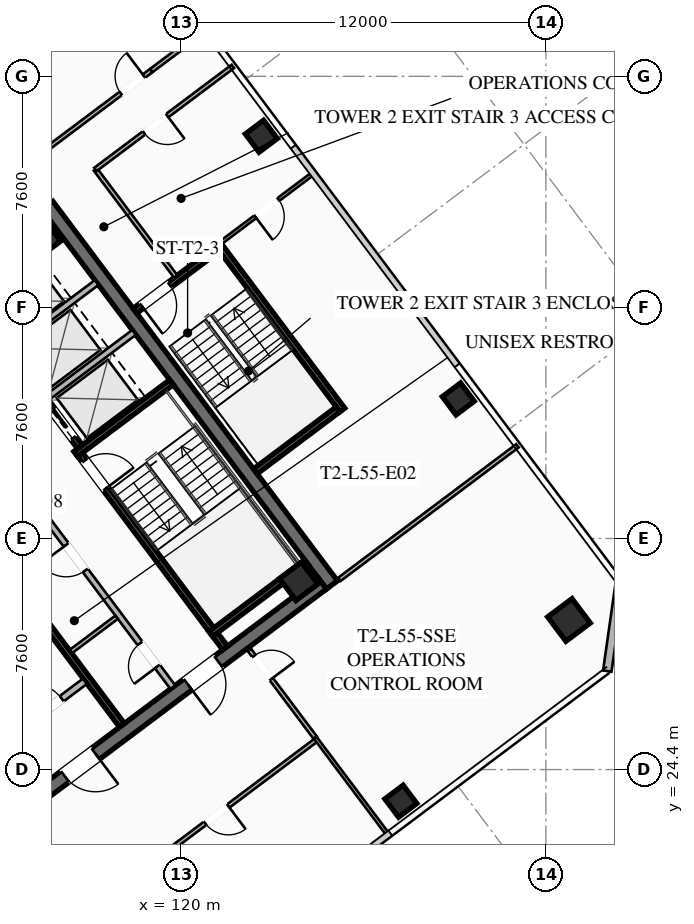
"""IFC4 building model, lengths in metres.
Left out: names, types, materials, properties, quantities, classifications, styles, units other than length and angle.
Written with IfcOpenShell. Run it as: python <this file> out.ifc"""

import sys

from ifc_helpers import new_model, si_unit, direction, frame, frame_2d, origin, origin_2d, place, context, subcontext, project, spatial, rectangle, hollow_rectangle, extrude, element, fill, save


model = new_model("IFC4")
c1 = context("Model", 3, precision=1e-05, world=origin(), true_north=direction((0.0, 1.0)))
c2 = subcontext(c1, "Body", "Model", "MODEL_VIEW")
j1 = project(units=[si_unit("LENGTHUNIT", "METRE"), si_unit("PLANEANGLEUNIT", "RADIAN")], contexts=[c1])
p1 = place(None, origin())
s1 = spatial("IfcSite", under=j1, at=p1, CompositionType="ELEMENT")
p2 = place(p1, origin())
s2 = spatial("IfcBuilding", under=s1, at=p2, CompositionType="ELEMENT")
p3 = place(p2, frame((0.0, 0.0, 204.2)))
s3 = spatial("IfcBuildingStorey", under=s2, at=p3, CompositionType="ELEMENT", Elevation=204.2)
p4 = place(p3, frame((115.604, 42.953, 0.0), z_axis=(0.0, 0.0, 1.0), x_axis=(0.600005007985, -0.799996243986, 0.0)))
e1 = element("IfcWall", 1, at=p4, inside=s3, PredefinedType="SHEAR", context=c2, shape_type="SweptSolid", body=[
    extrude(rectangle(XDim=15.6, YDim=0.45, at=frame_2d((7.8, 0.0))), origin(), (0.0, 0.0, 1.0), 3.55),
])
p5 = place(p3, frame((124.649, 30.518, 0.0), z_axis=(0.0, 0.0, 1.0), x_axis=(-0.8, -0.6, 0.0)))
e2 = element("IfcWall", 2, at=p5, inside=s3, PredefinedType="SHEAR", context=c2, shape_type="SweptSolid", body=[
    extrude(rectangle(XDim=15.26, YDim=0.45, at=frame_2d((7.63, 0.0))), origin(), (0.0, 0.0, 1.0), 3.55),
])
p6 = place(p5, frame((9.33, 0.0, 0.0)))
e3 = element("IfcOpeningElement", 3, at=p6, cuts=e2, PredefinedType="OPENING", context=c2, shape_type="SweptSolid", body=[
    extrude(rectangle(XDim=1.25, YDim=2.25, at=frame_2d((0.625, 1.125))), frame((0.0, 0.235, 0.0), z_axis=(0.0, -1.0, 0.0), x_axis=(1.0, 0.0, 0.0)), (0.0, 0.0, 1.0), 0.47),
])
p7 = place(p5, frame((4.28, 0.0, 0.0)))
e4 = element("IfcOpeningElement", 4, at=p7, cuts=e2, PredefinedType="OPENING", context=c2, shape_type="SweptSolid", body=[
    extrude(rectangle(XDim=1.25, YDim=2.25, at=frame_2d((0.625, 1.125))), frame((0.0, 0.235, 0.0), z_axis=(0.0, -1.0, 0.0), x_axis=(1.0, 0.0, 0.0)), (0.0, 0.0, 1.0), 0.47),
])
for number, where, z_axis, x_axis in (
    (5, (123.87, 30.59, 0.0), (0.0, 0.0, 1.0), (0.8, 0.6, 0.0)),
    (6, (115.41, 41.87, 0.0), (0.0, 0.0, 1.0), (0.8, 0.6, 0.0)),
):
    element("IfcColumn", number, at=place(p3, frame(where, z_axis=z_axis, x_axis=x_axis)), inside=s3, PredefinedType="COLUMN", context=c2, shape_type="SweptSolid", body=[
        extrude(hollow_rectangle(XDim=0.9, YDim=0.9, WallThickness=0.04, at=origin_2d()), origin(), (0.0, 0.0, 1.0), 3.37),
    ])
p8 = place(p3, frame((132.76, 29.32, 0.0), z_axis=(0.0, 0.0, 1.0), x_axis=(0.799999996291, 0.600000004945, 0.0)))
e7 = element("IfcColumn", 7, at=p8, inside=s3, PredefinedType="COLUMN", context=c2, shape_type="SweptSolid", body=[
    extrude(hollow_rectangle(XDim=1.0, YDim=1.0, WallThickness=0.04, at=origin_2d()), origin(), (0.0, 0.0, 1.0), 3.37),
])
for number, where, z_axis, x_axis in (
    (8, (127.23, 23.36, 0.0), (0.0, 0.0, 1.0), (0.8, 0.6, 0.0)),
    (9, (129.12, 36.59, 0.0), (0.0, 0.0, 1.0), (0.8, 0.6, 0.0)),
    (10, (122.64, 45.23, 0.0), (0.0, 0.0, 1.0), (0.8, 0.6, 0.0)),
):
    element("IfcColumn", number, at=place(p3, frame(where, z_axis=z_axis, x_axis=x_axis)), inside=s3, PredefinedType="COLUMN", context=c2, shape_type="SweptSolid", body=[
        extrude(hollow_rectangle(XDim=0.75, YDim=0.75, WallThickness=0.032, at=origin_2d()), origin(), (0.0, 0.0, 1.0), 3.37),
    ])
p9 = place(p3, frame((134.44, 30.58, 0.0), z_axis=(0.0, 0.0, 1.0), x_axis=(-0.14138683146, -0.989954425158, 0.0)))
e11 = element("IfcWall", 11, at=p9, inside=s3, PredefinedType="SOLIDWALL", context=c2, shape_type="SweptSolid", body=[
    extrude(rectangle(XDim=2.97, YDim=0.28, at=frame_2d((1.485, 0.0))), origin(), (0.0, 0.0, 1.0), 3.37),
])
p10 = place(p3, frame((116.56, 34.92, 0.0), z_axis=(0.0, 0.0, 1.0), x_axis=(0.59999041401, -0.800007189403, 0.0)))
e12 = element("IfcWall", 12, at=p10, inside=s3, PredefinedType="SHEAR", context=c2, shape_type="SweptSolid", body=[
    extrude(rectangle(XDim=8.15, YDim=0.2, at=frame_2d((4.075, 0.0))), origin(), (0.0, 0.0, 1.0), 3.37),
])
p11 = place(p10, frame((0.45, 0.0, 0.0)))
e13 = element("IfcOpeningElement", 13, at=p11, cuts=e12, PredefinedType="OPENING", context=c2, shape_type="SweptSolid", body=[
    extrude(rectangle(XDim=1.15, YDim=2.2, at=frame_2d((0.575, 1.1))), frame((0.0, 0.11, 0.0), z_axis=(0.0, -1.0, 0.0), x_axis=(1.0, 0.0, 0.0)), (0.0, 0.0, 1.0), 0.22),
])
for number, where, z_axis, x_axis in (
    (14, (116.54, 34.78, 0.0), (0.0, 0.0, 1.0), (0.8, 0.6, 0.0)),
    (15, (120.98, 28.86, 0.0), (0.0, 0.0, 1.0), (0.8, 0.6, 0.0)),
):
    element("IfcWall", number, at=place(p3, frame(where, z_axis=z_axis, x_axis=x_axis)), inside=s3, PredefinedType="SHEAR", context=c2, shape_type="SweptSolid", body=[
        extrude(rectangle(XDim=3.93, YDim=0.2, at=frame_2d((1.965, 0.0))), origin(), (0.0, 0.0, 1.0), 3.37),
    ])
p12 = place(p3, frame((118.058, 25.856, 0.0), z_axis=(0.0, 0.0, 1.0), x_axis=(-0.600002657301, 0.799998007018, 0.0)))
e16 = element("IfcWall", 16, at=p12, inside=s3, PredefinedType="SHEAR", context=c2, shape_type="SweptSolid", body=[
    extrude(rectangle(XDim=14.7, YDim=0.2, at=frame_2d((7.35, 0.0))), origin(), (0.0, 0.0, 1.0), 3.37),
])
p13 = place(p3, frame((114.316, 25.412, 0.0), z_axis=(0.0, 0.0, 1.0), x_axis=(0.800018601094, 0.59997519774, 0.0)))
e17 = element("IfcWall", 17, at=p13, inside=s3, PredefinedType="SOLIDWALL", context=c2, shape_type="SweptSolid", body=[
    extrude(rectangle(XDim=3.15, YDim=0.22, at=frame_2d((1.575, 0.0))), origin(), (0.0, 0.0, 1.0), 2.723),
])
p14 = place(p13, frame((0.95, 0.0, 0.0)))
e18 = element("IfcOpeningElement", 18, at=p14, cuts=e17, PredefinedType="OPENING", context=c2, shape_type="SweptSolid", body=[
    extrude(rectangle(XDim=1.25, YDim=2.25, at=frame_2d((0.625, 1.125))), frame((0.0, 0.12, 0.0), z_axis=(0.0, -1.0, 0.0), x_axis=(1.0, 0.0, 0.0)), (0.0, 0.0, 1.0), 0.24),
])
p15 = place(p3, frame((112.75, 40.25, 0.0), z_axis=(0.0, 0.0, 1.0), x_axis=(0.599994036198, -0.800004472816, 0.0)))
e19 = element("IfcWall", 19, at=p15, inside=s3, PredefinedType="SHEAR", context=c2, shape_type="SweptSolid", body=[
    extrude(rectangle(XDim=6.55, YDim=0.2, at=frame_2d((3.275, 0.0))), origin(), (0.0, 0.0, 1.0), 3.37),
])
p16 = place(p15, frame((5.075, 0.0, 0.0)))
e20 = element("IfcOpeningElement", 20, at=p16, cuts=e19, PredefinedType="OPENING", context=c2, shape_type="SweptSolid", body=[
    extrude(rectangle(XDim=1.1, YDim=2.2, at=frame_2d((0.55, 1.1))), frame((0.0, 0.11, 0.0), z_axis=(0.0, -1.0, 0.0), x_axis=(1.0, 0.0, 0.0)), (0.0, 0.0, 1.0), 0.22),
])
p17 = place(p15, frame((3.025, 0.0, 0.0)))
e21 = element("IfcOpeningElement", 21, at=p17, cuts=e19, PredefinedType="OPENING", context=c2, shape_type="SweptSolid", body=[
    extrude(rectangle(XDim=1.1, YDim=2.2, at=frame_2d((0.55, 1.1))), frame((0.0, 0.11, 0.0), z_axis=(0.0, -1.0, 0.0), x_axis=(1.0, 0.0, 0.0)), (0.0, 0.0, 1.0), 0.22),
])
p18 = place(p15, frame((1.025, 0.0, 0.0)))
e22 = element("IfcOpeningElement", 22, at=p18, cuts=e19, PredefinedType="OPENING", context=c2, shape_type="SweptSolid", body=[
    extrude(rectangle(XDim=1.1, YDim=2.2, at=frame_2d((0.55, 1.1))), frame((0.0, 0.11, 0.0), z_axis=(0.0, -1.0, 0.0), x_axis=(1.0, 0.0, 0.0)), (0.0, 0.0, 1.0), 0.22),
])
for number, where, z_axis, x_axis in (
    (23, (115.59, 36.63, 0.0), (0.0, 0.0, 1.0), (0.8, 0.6, 0.0)),
    (24, (114.36, 38.27, 0.0), (0.0, 0.0, 1.0), (0.8, 0.6, 0.0)),
):
    element("IfcWall", number, at=place(p3, frame(where, z_axis=z_axis, x_axis=x_axis)), inside=s3, PredefinedType="SOLIDWALL", context=c2, shape_type="SweptSolid", body=[
        extrude(rectangle(XDim=3.58, YDim=0.2, at=frame_2d((1.79, 0.0))), origin(), (0.0, 0.0, 1.0), 3.37),
    ])
p19 = place(p3, frame((119.73, 27.11, 0.0), z_axis=(0.0, 0.0, 1.0), x_axis=(-0.600005580459, 0.799995814625, 0.0)))
e25 = element("IfcWall", 25, at=p19, inside=s3, PredefinedType="SOLIDWALL", context=c2, shape_type="SweptSolid", body=[
    extrude(rectangle(XDim=7.0, YDim=0.2, at=frame_2d((3.5, 0.0))), origin(), (0.0, 0.0, 1.0), 2.723),
])
p20 = place(p19, frame((0.85, 0.0, 0.0)))
e26 = element("IfcOpeningElement", 26, at=p20, cuts=e25, PredefinedType="OPENING", context=c2, shape_type="SweptSolid", body=[
    extrude(rectangle(XDim=0.95, YDim=2.05, at=frame_2d((0.475, 1.025))), frame((0.0, 0.11, 0.0), z_axis=(0.0, -1.0, 0.0), x_axis=(1.0, 0.0, 0.0)), (0.0, 0.0, 1.0), 0.22),
])
p21 = place(p19, frame((4.8, 0.0, 0.0)))
e27 = element("IfcOpeningElement", 27, at=p21, cuts=e25, PredefinedType="OPENING", context=c2, shape_type="SweptSolid", body=[
    extrude(rectangle(XDim=1.05, YDim=2.2, at=frame_2d((0.525, 1.1))), frame((0.0, 0.11, 0.0), z_axis=(0.0, -1.0, 0.0), x_axis=(1.0, 0.0, 0.0)), (0.0, 0.0, 1.0), 0.22),
])
p22 = place(p3, frame((116.376, 28.282, 0.0), z_axis=(0.0, 0.0, 1.0), x_axis=(0.8, 0.6, 0.0)))
e28 = element("IfcWall", 28, at=p22, inside=s3, PredefinedType="PARTITIONING", context=c2, shape_type="SweptSolid", body=[
    extrude(rectangle(XDim=1.88, YDim=0.135, at=frame_2d((0.94, 0.0))), origin(), (0.0, 0.0, 1.0), 2.723),
])
p23 = place(p3, frame((125.304, 36.228, 0.0), z_axis=(0.0, 0.0, 1.0), x_axis=(-0.59998851072, 0.800008616831, 0.0)))
e29 = element("IfcWall", 29, at=p23, inside=s3, PredefinedType="SHEAR", context=c2, shape_type="SweptSolid", body=[
    extrude(rectangle(XDim=6.8, YDim=0.2, at=frame_2d((3.4, 0.0))), origin(), (0.0, 0.0, 1.0), 3.37),
])
p24 = place(p3, frame((121.204, 41.528, 0.0), z_axis=(0.0, 0.0, 1.0), x_axis=(-0.800017232136, -0.599977023131, 0.0)))
e30 = element("IfcWall", 30, at=p24, inside=s3, PredefinedType="SHEAR", context=c2, shape_type="SweptSolid", body=[
    extrude(rectangle(XDim=3.4, YDim=0.2, at=frame_2d((1.7, 0.0))), origin(), (0.0, 0.0, 1.0), 3.37),
])
p25 = place(p24, frame((1.975, 0.0, 0.0)))
e31 = element("IfcOpeningElement", 31, at=p25, cuts=e30, PredefinedType="OPENING", context=c2, shape_type="SweptSolid", body=[
    extrude(rectangle(XDim=1.15, YDim=2.2, at=frame_2d((0.575, 1.1))), frame((0.0, 0.11, 0.0), z_axis=(0.0, -1.0, 0.0), x_axis=(1.0, 0.0, 0.0)), (0.0, 0.0, 1.0), 0.22),
])
p26 = place(p3, frame((122.444, 34.208, 0.0), z_axis=(0.0, 0.0, 1.0), x_axis=(0.79999138319, 0.600011488909, 0.0)))
e32 = element("IfcWall", 32, at=p26, inside=s3, PredefinedType="SHEAR", context=c2, shape_type="SweptSolid", body=[
    extrude(rectangle(XDim=3.4, YDim=0.2, at=frame_2d((1.7, 0.0))), origin(), (0.0, 0.0, 1.0), 3.37),
])
p27 = place(p3, frame((119.824, 40.618, 0.0), z_axis=(0.0, 0.0, 1.0), x_axis=(-0.599982243973, 0.800013316712, 0.0)))
e33 = element("IfcWall", 33, at=p27, inside=s3, PredefinedType="PARTITIONING", context=c2, shape_type="SweptSolid", body=[
    extrude(rectangle(XDim=4.4, YDim=0.135, at=frame_2d((2.2, 0.0))), origin(), (0.0, 0.0, 1.0), 2.723),
])
p28 = place(p3, frame((100.756, 33.692, 0.0), z_axis=(0.0, 0.0, 1.0), x_axis=(0.799998716732, 0.60000171102, 0.0)))
e34 = element("IfcWall", 34, at=p28, inside=s3, PredefinedType="PARTITIONING", context=c2, shape_type="SweptSolid", body=[
    extrude(rectangle(XDim=22.83, YDim=0.135, at=frame_2d((11.415, 0.0))), origin(), (0.0, 0.0, 1.0), 2.723),
])
p29 = place(p28, frame((9.38, 0.0, 0.0)))
e35 = element("IfcOpeningElement", 35, at=p29, cuts=e34, PredefinedType="OPENING", context=c2, shape_type="SweptSolid", body=[
    extrude(rectangle(XDim=0.95, YDim=2.05, at=frame_2d((0.475, 1.025))), frame((0.0, 0.077, 0.0), z_axis=(0.0, -1.0, 0.0), x_axis=(1.0, 0.0, 0.0)), (0.0, 0.0, 1.0), 0.155),
])
p30 = place(p28, frame((21.58, 0.0, 0.0)))
e36 = element("IfcOpeningElement", 36, at=p30, cuts=e34, PredefinedType="OPENING", context=c2, shape_type="SweptSolid", body=[
    extrude(rectangle(XDim=0.95, YDim=2.05, at=frame_2d((0.475, 1.025))), frame((0.0, 0.077, 0.0), z_axis=(0.0, -1.0, 0.0), x_axis=(1.0, 0.0, 0.0)), (0.0, 0.0, 1.0), 0.155),
])
p31 = place(p3, frame((119.02, 47.39, 0.0), z_axis=(0.0, 0.0, 1.0), x_axis=(0.799960585956, 0.600052548463, 0.0)))
e37 = element("IfcWall", 37, at=p31, inside=s3, PredefinedType="PARTITIONING", context=c2, shape_type="SweptSolid", body=[
    extrude(rectangle(XDim=2.23, YDim=0.135, at=frame_2d((1.115, 0.0))), origin(), (0.0, 0.0, 1.0), 2.723),
])
p32 = place(p3, frame((124.462, 25.384, 0.0), z_axis=(0.0, 0.0, 1.0), x_axis=(-0.799997904343, -0.6000027942, 0.0)))
e38 = element("IfcWall", 38, at=p32, inside=s3, PredefinedType="PARTITIONING", context=c2, shape_type="SweptSolid", body=[
    extrude(rectangle(XDim=13.98, YDim=0.135, at=frame_2d((6.99, 0.0))), origin(), (0.0, 0.0, 1.0), 2.723),
])
p33 = place(p32, frame((3.635, 0.0, 0.0)))
e39 = element("IfcOpeningElement", 39, at=p33, cuts=e38, PredefinedType="OPENING", context=c2, shape_type="SweptSolid", body=[
    extrude(rectangle(XDim=0.95, YDim=2.05, at=frame_2d((0.475, 1.025))), frame((0.0, 0.077, 0.0), z_axis=(0.0, -1.0, 0.0), x_axis=(1.0, 0.0, 0.0)), (0.0, 0.0, 1.0), 0.155),
])
p34 = place(p3, frame((122.248, 28.336, 0.0), z_axis=(0.0, 0.0, 1.0), x_axis=(0.600010820699, -0.799991884361, 0.0)))
e40 = element("IfcWall", 40, at=p34, inside=s3, PredefinedType="PARTITIONING", context=c2, shape_type="SweptSolid", body=[
    extrude(rectangle(XDim=3.61, YDim=0.135, at=frame_2d((1.805, 0.0))), origin(), (0.0, 0.0, 1.0), 2.723),
])
p35 = place(p34, frame((0.25, 0.0, 0.0)))
e41 = element("IfcOpeningElement", 41, at=p35, cuts=e40, PredefinedType="OPENING", context=c2, shape_type="SweptSolid", body=[
    extrude(rectangle(XDim=0.95, YDim=2.05, at=frame_2d((0.475, 1.025))), frame((0.0, 0.077, 0.0), z_axis=(0.0, -1.0, 0.0), x_axis=(1.0, 0.0, 0.0)), (0.0, 0.0, 1.0), 0.155),
])
p36 = place(p3, frame((126.808, 22.256, 0.0), z_axis=(0.0, 0.0, 1.0), x_axis=(-0.600019580308, 0.799985314394, 0.0)))
e42 = element("IfcWall", 42, at=p36, inside=s3, PredefinedType="PARTITIONING", context=c2, shape_type="SweptSolid", body=[
    extrude(rectangle(XDim=3.99, YDim=0.11, at=frame_2d((1.995, 0.0))), origin(), (0.0, 0.0, 1.0), 2.723),
])
p37 = place(p3, frame((121.704, 47.528, 0.0), z_axis=(0.0, 0.0, 1.0), x_axis=(-0.799989629485, -0.600013827105, 0.0)))
e43 = element("IfcWall", 43, at=p37, inside=s3, PredefinedType="PARTITIONING", context=c2, shape_type="SweptSolid", body=[
    extrude(rectangle(XDim=5.65, YDim=0.135, at=frame_2d((2.825, 0.0))), origin(), (0.0, 0.0, 1.0), 2.723),
])
p38 = place(p37, frame((2.7, 0.0, 0.0)))
e44 = element("IfcOpeningElement", 44, at=p38, cuts=e43, PredefinedType="OPENING", context=c2, shape_type="SweptSolid", body=[
    extrude(rectangle(XDim=0.95, YDim=2.05, at=frame_2d((0.475, 1.025))), frame((0.0, 0.077, 0.0), z_axis=(0.0, -1.0, 0.0), x_axis=(1.0, 0.0, 0.0)), (0.0, 0.0, 1.0), 0.155),
])
p39 = place(p3, frame((125.208, 30.656, 0.0), z_axis=(0.0, 0.0, 1.0), x_axis=(0.79999199534, 0.600010672732, 0.0)))
e45 = element("IfcWall", 45, at=p39, inside=s3, PredefinedType="PARTITIONING", context=c2, shape_type="SweptSolid", body=[
    extrude(rectangle(XDim=7.32, YDim=0.135, at=frame_2d((3.66, 0.0))), origin(), (0.0, 0.0, 1.0), 2.723),
])
p40 = place(p3, frame((124.344, 44.008, 0.0), z_axis=(0.0, 0.0, 1.0), x_axis=(-0.8, -0.6, 0.0)))
e46 = element("IfcWall", 46, at=p40, inside=s3, PredefinedType="PARTITIONING", context=c2, shape_type="SweptSolid", body=[
    extrude(rectangle(XDim=3.8, YDim=0.11, at=frame_2d((1.9, 0.0))), origin(), (0.0, 0.0, 1.0), 2.723),
])
p41 = place(p40, frame((1.425, 0.0, 0.0)))
e47 = element("IfcOpeningElement", 47, at=p41, cuts=e46, PredefinedType="OPENING", context=c2, shape_type="SweptSolid", body=[
    extrude(rectangle(XDim=0.95, YDim=2.05, at=frame_2d((0.475, 1.025))), frame((0.0, 0.065, 0.0), z_axis=(0.0, -1.0, 0.0), x_axis=(1.0, 0.0, 0.0)), (0.0, 0.0, 1.0), 0.13),
])
p42 = place(p6, origin())
e48 = element("IfcDoor", 48, at=p42, inside=s3, OperationType="SINGLE_SWING_LEFT", PredefinedType="DOOR", context=c2, shape_type="SweptSolid", body=[
    extrude(rectangle(XDim=1.25, YDim=2.25, at=frame_2d((0.625, 1.125))), frame((0.0, 0.025, 0.0), z_axis=(0.0, -1.0, 0.0), x_axis=(1.0, 0.0, 0.0)), (0.0, 0.0, 1.0), 0.05),
])
fill(e3, e48)
p43 = place(p7, origin())
e49 = element("IfcDoor", 49, at=p43, inside=s3, OperationType="SINGLE_SWING_RIGHT", PredefinedType="DOOR", context=c2, shape_type="SweptSolid", body=[
    extrude(rectangle(XDim=1.25, YDim=2.25, at=frame_2d((0.625, 1.125))), frame((0.0, 0.025, 0.0), z_axis=(0.0, -1.0, 0.0), x_axis=(1.0, 0.0, 0.0)), (0.0, 0.0, 1.0), 0.05),
])
fill(e4, e49)
p44 = place(p11, origin())
e50 = element("IfcDoor", 50, at=p44, inside=s3, OperationType="SINGLE_SWING_RIGHT", PredefinedType="DOOR", context=c2, shape_type="SweptSolid", body=[
    extrude(rectangle(XDim=1.15, YDim=2.2, at=frame_2d((0.575, 1.1))), frame((0.0, 0.025, 0.0), z_axis=(0.0, -1.0, 0.0), x_axis=(1.0, 0.0, 0.0)), (0.0, 0.0, 1.0), 0.05),
])
fill(e13, e50)
p45 = place(p14, origin())
e51 = element("IfcDoor", 51, at=p45, inside=s3, OperationType="SINGLE_SWING_LEFT", PredefinedType="DOOR", context=c2, shape_type="SweptSolid", body=[
    extrude(rectangle(XDim=1.25, YDim=2.25, at=frame_2d((0.625, 1.125))), frame((0.0, 0.025, 0.0), z_axis=(0.0, -1.0, 0.0), x_axis=(1.0, 0.0, 0.0)), (0.0, 0.0, 1.0), 0.05),
])
fill(e18, e51)
p46 = place(p20, origin())
e52 = element("IfcDoor", 52, at=p46, inside=s3, OperationType="SINGLE_SWING_LEFT", PredefinedType="DOOR", context=c2, shape_type="SweptSolid", body=[
    extrude(rectangle(XDim=0.95, YDim=2.05, at=frame_2d((0.475, 1.025))), frame((0.0, 0.025, 0.0), z_axis=(0.0, -1.0, 0.0), x_axis=(1.0, 0.0, 0.0)), (0.0, 0.0, 1.0), 0.05),
])
fill(e26, e52)
p47 = place(p21, origin())
e53 = element("IfcDoor", 53, at=p47, inside=s3, OperationType="SINGLE_SWING_RIGHT", PredefinedType="DOOR", context=c2, shape_type="SweptSolid", body=[
    extrude(rectangle(XDim=1.05, YDim=2.2, at=frame_2d((0.525, 1.1))), frame((0.0, 0.025, 0.0), z_axis=(0.0, -1.0, 0.0), x_axis=(1.0, 0.0, 0.0)), (0.0, 0.0, 1.0), 0.05),
])
fill(e27, e53)
p48 = place(p25, origin())
e54 = element("IfcDoor", 54, at=p48, inside=s3, OperationType="SINGLE_SWING_RIGHT", PredefinedType="DOOR", context=c2, shape_type="SweptSolid", body=[
    extrude(rectangle(XDim=1.15, YDim=2.2, at=frame_2d((0.575, 1.1))), frame((0.0, 0.025, 0.0), z_axis=(0.0, -1.0, 0.0), x_axis=(1.0, 0.0, 0.0)), (0.0, 0.0, 1.0), 0.05),
])
fill(e31, e54)
p49 = place(p30, origin())
e55 = element("IfcDoor", 55, at=p49, inside=s3, OperationType="SINGLE_SWING_RIGHT", PredefinedType="DOOR", context=c2, shape_type="SweptSolid", body=[
    extrude(rectangle(XDim=0.95, YDim=2.05, at=frame_2d((0.475, 1.025))), frame((0.0, 0.025, 0.0), z_axis=(0.0, -1.0, 0.0), x_axis=(1.0, 0.0, 0.0)), (0.0, 0.0, 1.0), 0.05),
])
fill(e36, e55)
p50 = place(p33, origin())
e56 = element("IfcDoor", 56, at=p50, inside=s3, OperationType="SINGLE_SWING_LEFT", PredefinedType="DOOR", context=c2, shape_type="SweptSolid", body=[
    extrude(rectangle(XDim=0.95, YDim=2.05, at=frame_2d((0.475, 1.025))), frame((0.0, 0.025, 0.0), z_axis=(0.0, -1.0, 0.0), x_axis=(1.0, 0.0, 0.0)), (0.0, 0.0, 1.0), 0.05),
])
fill(e39, e56)
p51 = place(p35, origin())
e57 = element("IfcDoor", 57, at=p51, inside=s3, OperationType="SINGLE_SWING_RIGHT", PredefinedType="DOOR", context=c2, shape_type="SweptSolid", body=[
    extrude(rectangle(XDim=0.95, YDim=2.05, at=frame_2d((0.475, 1.025))), frame((0.0, 0.025, 0.0), z_axis=(0.0, -1.0, 0.0), x_axis=(1.0, 0.0, 0.0)), (0.0, 0.0, 1.0), 0.05),
])
fill(e41, e57)
p52 = place(p38, origin())
e58 = element("IfcDoor", 58, at=p52, inside=s3, OperationType="SINGLE_SWING_LEFT", PredefinedType="DOOR", context=c2, shape_type="SweptSolid", body=[
    extrude(rectangle(XDim=0.95, YDim=2.05, at=frame_2d((0.475, 1.025))), frame((0.0, 0.025, 0.0), z_axis=(0.0, -1.0, 0.0), x_axis=(1.0, 0.0, 0.0)), (0.0, 0.0, 1.0), 0.05),
])
fill(e44, e58)
p53 = place(p41, origin())
e59 = element("IfcDoor", 59, at=p53, inside=s3, OperationType="SINGLE_SWING_RIGHT", PredefinedType="DOOR", context=c2, shape_type="SweptSolid", body=[
    extrude(rectangle(XDim=0.95, YDim=2.05, at=frame_2d((0.475, 1.025))), frame((0.0, 0.025, 0.0), z_axis=(0.0, -1.0, 0.0), x_axis=(1.0, 0.0, 0.0)), (0.0, 0.0, 1.0), 0.05),
])
fill(e47, e59)
p54 = place(p16, origin())
e60 = element("IfcDoor", 60, at=p54, inside=s3, OperationType="SLIDING_TO_LEFT", PredefinedType="DOOR", context=c2, shape_type="SweptSolid", body=[
    extrude(rectangle(XDim=1.1, YDim=2.2, at=frame_2d((0.55, 1.1))), frame((0.0, 0.025, 0.0), z_axis=(0.0, -1.0, 0.0), x_axis=(1.0, 0.0, 0.0)), (0.0, 0.0, 1.0), 0.05),
])
fill(e20, e60)
save(model, sys.argv[1])
